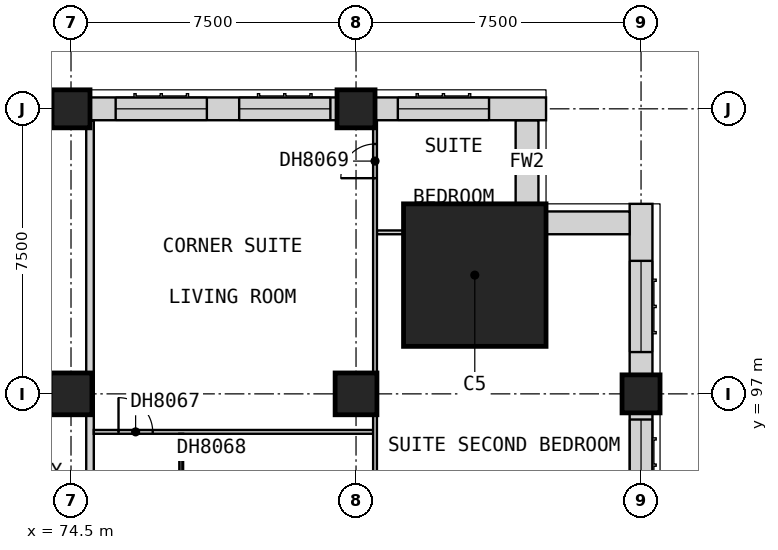
"""IFC4 building model, lengths in metres.
Left out: names, types, materials, properties, quantities, classifications, styles, units other than length and angle.
Written with IfcOpenShell. Run it as: python <this file> out.ifc"""

import sys

from ifc_helpers import new_model, si_unit, direction, frame, frame_2d, origin, origin_2d, place, context, subcontext, project, spatial, rectangle, extrude, element, fill, save


model = new_model("IFC4")
c1 = context("Model", 3, precision=1e-05, world=origin(), true_north=direction((0.0, 1.0)))
c2 = subcontext(c1, "Body", "Model", "MODEL_VIEW")
j1 = project(units=[si_unit("LENGTHUNIT", "METRE"), si_unit("PLANEANGLEUNIT", "RADIAN")], contexts=[c1])
p1 = place(None, origin())
s1 = spatial("IfcSite", under=j1, at=p1, CompositionType="ELEMENT")
p2 = place(p1, origin())
s2 = spatial("IfcBuilding", under=s1, at=p2, CompositionType="ELEMENT")
p3 = place(p2, frame((0.0, 0.0, 89.9)))
s3 = spatial("IfcBuildingStorey", under=s2, at=p3, CompositionType="ELEMENT", Elevation=89.9)
p4 = place(p3, frame((74.5, 97.0, 0.0), z_axis=(0.0, 0.0, 1.0), x_axis=(1.0, 0.0, 0.0)))
e1 = element("IfcColumn", 1, at=p4, inside=s3, PredefinedType="COLUMN", context=c2, shape_type="SweptSolid", body=[
    extrude(rectangle(XDim=1.1, YDim=1.1, at=origin_2d()), origin(), (0.0, 0.0, 1.0), 3.6),
])
p5 = place(p3, frame((74.5, 104.5, 0.0), z_axis=(0.0, 0.0, 1.0), x_axis=(1.0, 0.0, 0.0)))
e2 = element("IfcColumn", 2, at=p5, inside=s3, PredefinedType="COLUMN", context=c2, shape_type="SweptSolid", body=[
    extrude(rectangle(XDim=1.0, YDim=1.0, at=origin_2d()), origin(), (0.0, 0.0, 1.0), 3.6),
])
p6 = place(p3, frame((82.0, 97.0, 0.0), z_axis=(0.0, 0.0, 1.0), x_axis=(1.0, 0.0, 0.0)))
e3 = element("IfcColumn", 3, at=p6, inside=s3, PredefinedType="COLUMN", context=c2, shape_type="SweptSolid", body=[
    extrude(rectangle(XDim=1.1, YDim=1.1, at=origin_2d()), origin(), (0.0, 0.0, 1.0), 3.6),
])
for number, where, z_axis, x_axis in (
    (4, (82.0, 104.5, 0.0), (0.0, 0.0, 1.0), (1.0, 0.0, 0.0)),
    (5, (89.5, 97.0, 0.0), (0.0, 0.0, 1.0), (1.0, 0.0, 0.0)),
):
    element("IfcColumn", number, at=place(p3, frame(where, z_axis=z_axis, x_axis=x_axis)), inside=s3, PredefinedType="COLUMN", context=c2, shape_type="SweptSolid", body=[
        extrude(rectangle(XDim=1.0, YDim=1.0, at=origin_2d()), origin(), (0.0, 0.0, 1.0), 3.6),
    ])
p7 = place(p3, frame((85.125, 100.125, 0.0), z_axis=(0.0, 0.0, 1.0), x_axis=(1.0, 0.0, 0.0)))
e6 = element("IfcColumn", 6, at=p7, inside=s3, PredefinedType="COLUMN", context=c2, shape_type="SweptSolid", body=[
    extrude(rectangle(XDim=3.75, YDim=3.75, at=origin_2d()), origin(), (0.0, 0.0, 1.0), 3.6),
])
p8 = place(p3, frame((89.5, 90.5, 0.0), z_axis=(0.0, 0.0, 1.0), x_axis=(0.0, 1.0, 0.0)))
e7 = element("IfcWall", 7, at=p8, inside=s3, PredefinedType="SOLIDWALL", context=c2, shape_type="SweptSolid", body=[
    extrude(rectangle(XDim=6.0, YDim=0.6, at=frame_2d((3.0, 0.0))), origin(), (0.0, 0.0, 1.0), 2.85),
])
p9 = place(p8, frame((0.425, 0.0, 0.8)))
e8 = element("IfcOpeningElement", 8, at=p9, cuts=e7, PredefinedType="OPENING", context=c2, shape_type="SweptSolid", body=[
    extrude(rectangle(XDim=2.4, YDim=1.8, at=frame_2d((1.2, 0.9))), frame((0.0, 0.31, 0.0), z_axis=(0.0, -1.0, 0.0), x_axis=(1.0, 0.0, 0.0)), (0.0, 0.0, 1.0), 0.62),
])
p10 = place(p8, frame((3.425, 0.0, 0.8)))
e9 = element("IfcOpeningElement", 9, at=p10, cuts=e7, PredefinedType="OPENING", context=c2, shape_type="SweptSolid", body=[
    extrude(rectangle(XDim=2.4, YDim=1.8, at=frame_2d((1.2, 0.9))), frame((0.0, 0.31, 0.0), z_axis=(0.0, -1.0, 0.0), x_axis=(1.0, 0.0, 0.0)), (0.0, 0.0, 1.0), 0.62),
])
p11 = place(p3, frame((89.5, 97.5, 0.0), z_axis=(0.0, 0.0, 1.0), x_axis=(0.0, 1.0, 0.0)))
e10 = element("IfcWall", 10, at=p11, inside=s3, PredefinedType="SOLIDWALL", context=c2, shape_type="SweptSolid", body=[
    extrude(rectangle(XDim=4.5, YDim=0.6, at=frame_2d((2.25, 0.0))), origin(), (0.0, 0.0, 1.0), 2.85),
])
p12 = place(p11, frame((0.6, 0.0, 0.8)))
e11 = element("IfcOpeningElement", 11, at=p12, cuts=e10, PredefinedType="OPENING", context=c2, shape_type="SweptSolid", body=[
    extrude(rectangle(XDim=2.4, YDim=1.8, at=frame_2d((1.2, 0.9))), frame((0.0, 0.31, 0.0), z_axis=(0.0, -1.0, 0.0), x_axis=(1.0, 0.0, 0.0)), (0.0, 0.0, 1.0), 0.62),
])
for number, where, z_axis, x_axis in (
    (12, (89.2, 101.5, 0.0), (0.0, 0.0, 1.0), (-1.0, 0.0, 0.0)),
    (13, (86.5, 102.0, 0.0), (0.0, 0.0, 1.0), (0.0, 1.0, 0.0)),
):
    element("IfcWall", number, at=place(p3, frame(where, z_axis=z_axis, x_axis=x_axis)), inside=s3, PredefinedType="SOLIDWALL", context=c2, shape_type="SweptSolid", body=[
        extrude(rectangle(XDim=2.2, YDim=0.6, at=frame_2d((1.1, 0.0))), origin(), (0.0, 0.0, 1.0), 3.35),
    ])
p13 = place(p3, frame((87.0, 104.5, 0.0), z_axis=(0.0, 0.0, 1.0), x_axis=(-1.0, 0.0, 0.0)))
e14 = element("IfcWall", 14, at=p13, inside=s3, PredefinedType="SOLIDWALL", context=c2, shape_type="SweptSolid", body=[
    extrude(rectangle(XDim=4.5, YDim=0.6, at=frame_2d((2.25, 0.0))), origin(), (0.0, 0.0, 1.0), 2.85),
])
p14 = place(p13, frame((1.5, 0.0, 0.8)))
e15 = element("IfcOpeningElement", 15, at=p14, cuts=e14, PredefinedType="OPENING", context=c2, shape_type="SweptSolid", body=[
    extrude(rectangle(XDim=2.4, YDim=1.8, at=frame_2d((1.2, 0.9))), frame((0.0, 0.31, 0.0), z_axis=(0.0, -1.0, 0.0), x_axis=(1.0, 0.0, 0.0)), (0.0, 0.0, 1.0), 0.62),
])
p15 = place(p3, frame((81.5, 104.5, 0.0), z_axis=(0.0, 0.0, 1.0), x_axis=(-1.0, 0.0, 0.0)))
e16 = element("IfcWall", 16, at=p15, inside=s3, PredefinedType="SOLIDWALL", context=c2, shape_type="SweptSolid", body=[
    extrude(rectangle(XDim=6.5, YDim=0.6, at=frame_2d((3.25, 0.0))), origin(), (0.0, 0.0, 1.0), 2.85),
])
p16 = place(p15, frame((3.425, 0.0, 0.8)))
e17 = element("IfcOpeningElement", 17, at=p16, cuts=e16, PredefinedType="OPENING", context=c2, shape_type="SweptSolid", body=[
    extrude(rectangle(XDim=2.4, YDim=1.8, at=frame_2d((1.2, 0.9))), frame((0.0, 0.31, 0.0), z_axis=(0.0, -1.0, 0.0), x_axis=(1.0, 0.0, 0.0)), (0.0, 0.0, 1.0), 0.62),
])
p17 = place(p15, frame((0.175, 0.0, 0.8)))
e18 = element("IfcOpeningElement", 18, at=p17, cuts=e16, PredefinedType="OPENING", context=c2, shape_type="SweptSolid", body=[
    extrude(rectangle(XDim=2.4, YDim=1.8, at=frame_2d((1.2, 0.9))), frame((0.0, 0.31, 0.0), z_axis=(0.0, -1.0, 0.0), x_axis=(1.0, 0.0, 0.0)), (0.0, 0.0, 1.0), 0.62),
])
p18 = place(p3, frame((75.0, 92.475, 0.0), z_axis=(0.0, 0.0, 1.0), x_axis=(0.0, 1.0, 0.0)))
e19 = element("IfcWall", 19, at=p18, inside=s3, PredefinedType="PARTITIONING", context=c2, shape_type="SweptSolid", body=[
    extrude(rectangle(XDim=11.715, YDim=0.2, at=frame_2d((5.857, 0.0))), origin(), (0.0, 0.0, 1.0), 3.35),
])
p19 = place(p3, frame((75.1, 96.0, 0.0), z_axis=(0.0, 0.0, 1.0), x_axis=(1.0, 0.0, 0.0)))
e20 = element("IfcWall", 20, at=p19, inside=s3, PredefinedType="PARTITIONING", context=c2, shape_type="SweptSolid", body=[
    extrude(rectangle(XDim=7.35, YDim=0.1, at=frame_2d((3.675, 0.0))), origin(), (0.0, 0.0, 1.0), 3.35),
])
p20 = place(p19, frame((0.65, 0.0, 0.0)))
e21 = element("IfcOpeningElement", 21, at=p20, cuts=e20, PredefinedType="OPENING", context=c2, shape_type="SweptSolid", body=[
    extrude(rectangle(XDim=0.9, YDim=2.1, at=frame_2d((0.45, 1.05))), frame((0.0, 0.06, 0.0), z_axis=(0.0, -1.0, 0.0), x_axis=(1.0, 0.0, 0.0)), (0.0, 0.0, 1.0), 0.12),
])
p21 = place(p3, frame((72.062, 96.75, 0.0), z_axis=(0.0, 0.0, 1.0), x_axis=(1.0, 0.0, 0.0)))
e22 = element("IfcWall", 22, at=p21, inside=s3, PredefinedType="PARTITIONING", context=c2, shape_type="SweptSolid", body=[
    extrude(rectangle(XDim=2.837, YDim=0.1, at=frame_2d((1.419, 0.0))), origin(), (0.0, 0.0, 1.0), 3.35),
])
p22 = place(p21, frame((0.938, 0.0, 0.0)))
e23 = element("IfcOpeningElement", 23, at=p22, cuts=e22, PredefinedType="OPENING", context=c2, shape_type="SweptSolid", body=[
    extrude(rectangle(XDim=0.9, YDim=2.1, at=frame_2d((0.45, 1.05))), frame((0.0, 0.06, 0.0), z_axis=(0.0, -1.0, 0.0), x_axis=(1.0, 0.0, 0.0)), (0.0, 0.0, 1.0), 0.12),
])
p23 = place(p3, frame((82.55, 101.25, 0.0), z_axis=(0.0, 0.0, 1.0), x_axis=(1.0, 0.0, 0.0)))
e24 = element("IfcWall", 24, at=p23, inside=s3, PredefinedType="PARTITIONING", context=c2, shape_type="SweptSolid", body=[
    extrude(rectangle(XDim=4.44, YDim=0.1, at=frame_2d((2.22, 0.0))), origin(), (0.0, 0.0, 1.0), 3.35),
])
p24 = place(p3, frame((77.4, 92.475, 0.0), z_axis=(0.0, 0.0, 1.0), x_axis=(0.0, 1.0, 0.0)))
e25 = element("IfcWall", 25, at=p24, inside=s3, PredefinedType="PARTITIONING", context=c2, shape_type="SweptSolid", body=[
    extrude(rectangle(XDim=3.475, YDim=0.1, at=frame_2d((1.737, 0.0))), origin(), (0.0, 0.0, 1.0), 3.35),
])
p25 = place(p24, frame((1.275, 0.0, 0.0)))
e26 = element("IfcOpeningElement", 26, at=p25, cuts=e25, PredefinedType="OPENING", context=c2, shape_type="SweptSolid", body=[
    extrude(rectangle(XDim=0.9, YDim=2.1, at=frame_2d((0.45, 1.05))), frame((0.0, 0.06, 0.0), z_axis=(0.0, -1.0, 0.0), x_axis=(1.0, 0.0, 0.0)), (0.0, 0.0, 1.0), 0.12),
])
p26 = place(p3, frame((82.5, 92.462, 0.0), z_axis=(0.0, 0.0, 1.0), x_axis=(0.0, 1.0, 0.0)))
e27 = element("IfcWall", 27, at=p26, inside=s3, PredefinedType="PARTITIONING", context=c2, shape_type="SweptSolid", body=[
    extrude(rectangle(XDim=11.728, YDim=0.1, at=frame_2d((5.864, 0.0))), origin(), (0.0, 0.0, 1.0), 3.35),
])
p27 = place(p26, frame((10.212, 0.0, 0.0)))
e28 = element("IfcOpeningElement", 28, at=p27, cuts=e27, PredefinedType="OPENING", context=c2, shape_type="SweptSolid", body=[
    extrude(rectangle(XDim=0.9, YDim=2.1, at=frame_2d((0.45, 1.05))), frame((0.0, 0.06, 0.0), z_axis=(0.0, -1.0, 0.0), x_axis=(1.0, 0.0, 0.0)), (0.0, 0.0, 1.0), 0.12),
])
p28 = place(p26, frame((1.288, 0.0, 0.0)))
e29 = element("IfcOpeningElement", 29, at=p28, cuts=e27, PredefinedType="OPENING", context=c2, shape_type="SweptSolid", body=[
    extrude(rectangle(XDim=0.9, YDim=2.1, at=frame_2d((0.45, 1.05))), frame((0.0, 0.06, 0.0), z_axis=(0.0, -1.0, 0.0), x_axis=(1.0, 0.0, 0.0)), (0.0, 0.0, 1.0), 0.12),
])
p29 = place(p10, origin())
e30 = element("IfcWindow", 30, at=p29, inside=s3, PartitioningType="SINGLE_PANEL", PredefinedType="WINDOW", context=c2, shape_type="SweptSolid", body=[
    extrude(rectangle(XDim=2.4, YDim=1.8, at=frame_2d((1.2, 0.9))), frame((0.0, -0.07, 0.0), z_axis=(0.0, -1.0, 0.0), x_axis=(1.0, 0.0, 0.0)), (0.0, 0.0, 1.0), 0.06),
])
fill(e9, e30)
p30 = place(p12, origin())
e31 = element("IfcWindow", 31, at=p30, inside=s3, PartitioningType="SINGLE_PANEL", PredefinedType="WINDOW", context=c2, shape_type="SweptSolid", body=[
    extrude(rectangle(XDim=2.4, YDim=1.8, at=frame_2d((1.2, 0.9))), frame((0.0, -0.07, 0.0), z_axis=(0.0, -1.0, 0.0), x_axis=(1.0, 0.0, 0.0)), (0.0, 0.0, 1.0), 0.06),
])
fill(e11, e31)
p31 = place(p14, origin())
e32 = element("IfcWindow", 32, at=p31, inside=s3, PartitioningType="SINGLE_PANEL", PredefinedType="WINDOW", context=c2, shape_type="SweptSolid", body=[
    extrude(rectangle(XDim=2.4, YDim=1.8, at=frame_2d((1.2, 0.9))), frame((0.0, -0.07, 0.0), z_axis=(0.0, -1.0, 0.0), x_axis=(1.0, 0.0, 0.0)), (0.0, 0.0, 1.0), 0.06),
])
fill(e15, e32)
p32 = place(p16, origin())
e33 = element("IfcWindow", 33, at=p32, inside=s3, PartitioningType="SINGLE_PANEL", PredefinedType="WINDOW", context=c2, shape_type="SweptSolid", body=[
    extrude(rectangle(XDim=2.4, YDim=1.8, at=frame_2d((1.2, 0.9))), frame((0.0, -0.07, 0.0), z_axis=(0.0, -1.0, 0.0), x_axis=(1.0, 0.0, 0.0)), (0.0, 0.0, 1.0), 0.06),
])
fill(e17, e33)
p33 = place(p17, origin())
e34 = element("IfcWindow", 34, at=p33, inside=s3, PartitioningType="SINGLE_PANEL", PredefinedType="WINDOW", context=c2, shape_type="SweptSolid", body=[
    extrude(rectangle(XDim=2.4, YDim=1.8, at=frame_2d((1.2, 0.9))), frame((0.0, -0.07, 0.0), z_axis=(0.0, -1.0, 0.0), x_axis=(1.0, 0.0, 0.0)), (0.0, 0.0, 1.0), 0.06),
])
fill(e18, e34)
p34 = place(p20, origin())
e35 = element("IfcDoor", 35, at=p34, inside=s3, OperationType="SINGLE_SWING_LEFT", PredefinedType="DOOR", context=c2, shape_type="SweptSolid", body=[
    extrude(rectangle(XDim=0.9, YDim=2.1, at=frame_2d((0.45, 1.05))), frame((0.0, 0.025, 0.0), z_axis=(0.0, -1.0, 0.0), x_axis=(1.0, 0.0, 0.0)), (0.0, 0.0, 1.0), 0.05),
])
fill(e21, e35)
p35 = place(p27, origin())
e36 = element("IfcDoor", 36, at=p35, inside=s3, OperationType="SINGLE_SWING_LEFT", PredefinedType="DOOR", context=c2, shape_type="SweptSolid", body=[
    extrude(rectangle(XDim=0.9, YDim=2.1, at=frame_2d((0.45, 1.05))), frame((0.0, 0.025, 0.0), z_axis=(0.0, -1.0, 0.0), x_axis=(1.0, 0.0, 0.0)), (0.0, 0.0, 1.0), 0.05),
])
fill(e28, e36)
save(model, sys.argv[1])
